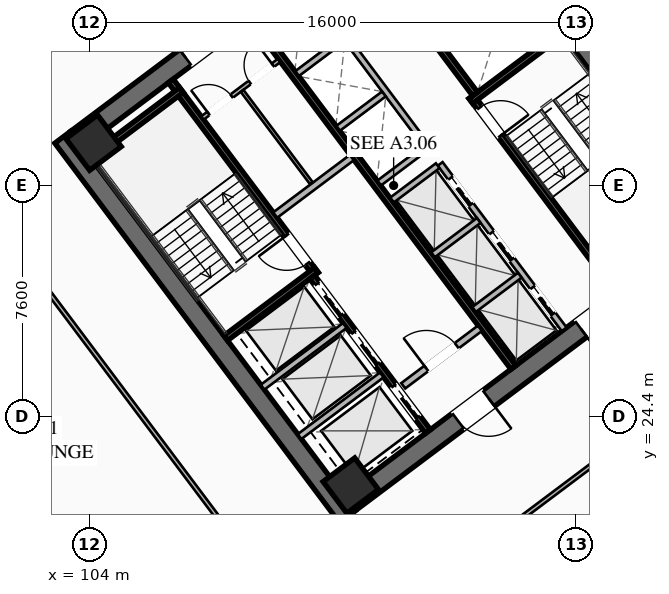
"""IFC4 building model, lengths in metres.
Left out: names, types, materials, properties, quantities, classifications, styles, units other than length and angle.
Written with IfcOpenShell. Run it as: python <this file> out.ifc"""

import sys

from ifc_helpers import new_model, si_unit, direction, frame, frame_2d, origin, origin_2d, place, context, subcontext, project, spatial, rectangle, hollow_rectangle, extrude, element, fill, save


model = new_model("IFC4")
c1 = context("Model", 3, precision=1e-05, world=origin(), true_north=direction((0.0, 1.0)))
c2 = subcontext(c1, "Body", "Model", "MODEL_VIEW")
j1 = project(units=[si_unit("LENGTHUNIT", "METRE"), si_unit("PLANEANGLEUNIT", "RADIAN")], contexts=[c1])
p1 = place(None, origin())
s1 = spatial("IfcSite", under=j1, at=p1, CompositionType="ELEMENT")
p2 = place(p1, origin())
s2 = spatial("IfcBuilding", under=s1, at=p2, CompositionType="ELEMENT")
p3 = place(p2, frame((0.0, 0.0, 81.4)))
s3 = spatial("IfcBuildingStorey", under=s2, at=p3, CompositionType="ELEMENT", Elevation=81.4)
for number, where, z_axis, x_axis in (
    (1, (112.476, 21.107, 0.0), (0.0, 0.0, 1.0), (-0.6, 0.8, 0.0)),
    (2, (115.524, 42.893, 0.0), (0.0, 0.0, 1.0), (0.6, -0.8, 0.0)),
):
    element("IfcWall", number, at=place(p3, frame(where, z_axis=z_axis, x_axis=x_axis)), inside=s3, PredefinedType="SHEAR", context=c2, shape_type="SweptSolid", body=[
        extrude(rectangle(XDim=15.6, YDim=0.65, at=frame_2d((7.8, 0.0))), origin(), (0.0, 0.0, 1.0), 3.55),
    ])
p4 = place(p3, frame((124.429, 30.478, 0.0), z_axis=(0.0, 0.0, 1.0), x_axis=(-0.799998028465, -0.600002628705, 0.0)))
e3 = element("IfcWall", 3, at=p4, inside=s3, PredefinedType="SHEAR", context=c2, shape_type="SweptSolid", body=[
    extrude(rectangle(XDim=14.86, YDim=0.65, at=frame_2d((7.43, 0.0))), origin(), (0.0, 0.0, 1.0), 3.55),
])
p5 = place(p4, frame((9.13, 0.0, 0.0)))
e4 = element("IfcOpeningElement", 4, at=p5, cuts=e3, PredefinedType="OPENING", context=c2, shape_type="SweptSolid", body=[
    extrude(rectangle(XDim=1.25, YDim=2.25, at=frame_2d((0.625, 1.125))), frame((0.0, 0.335, 0.0), z_axis=(0.0, -1.0, 0.0), x_axis=(1.0, 0.0, 0.0)), (0.0, 0.0, 1.0), 0.67),
])
p6 = place(p4, frame((4.08, 0.0, 0.0)))
e5 = element("IfcOpeningElement", 5, at=p6, cuts=e3, PredefinedType="OPENING", context=c2, shape_type="SweptSolid", body=[
    extrude(rectangle(XDim=1.25, YDim=2.25, at=frame_2d((0.625, 1.125))), frame((0.0, 0.335, 0.0), z_axis=(0.0, -1.0, 0.0), x_axis=(1.0, 0.0, 0.0)), (0.0, 0.0, 1.0), 0.67),
])
p7 = place(p3, frame((103.571, 33.522, 0.0), z_axis=(0.0, 0.0, 1.0), x_axis=(0.799998028465, 0.600002628705, 0.0)))
e6 = element("IfcWall", 6, at=p7, inside=s3, PredefinedType="SHEAR", context=c2, shape_type="SweptSolid", body=[
    extrude(rectangle(XDim=14.86, YDim=0.65, at=frame_2d((7.43, 0.0))), origin(), (0.0, 0.0, 1.0), 3.55),
])
p8 = place(p7, frame((4.48, 0.0, 0.0)))
e7 = element("IfcOpeningElement", 7, at=p8, cuts=e6, PredefinedType="OPENING", context=c2, shape_type="SweptSolid", body=[
    extrude(rectangle(XDim=1.25, YDim=2.25, at=frame_2d((0.625, 1.125))), frame((0.0, 0.335, 0.0), z_axis=(0.0, -1.0, 0.0), x_axis=(1.0, 0.0, 0.0)), (0.0, 0.0, 1.0), 0.67),
])
p9 = place(p7, frame((9.53, 0.0, 0.0)))
e8 = element("IfcOpeningElement", 8, at=p9, cuts=e6, PredefinedType="OPENING", context=c2, shape_type="SweptSolid", body=[
    extrude(rectangle(XDim=1.25, YDim=2.25, at=frame_2d((0.625, 1.125))), frame((0.0, 0.335, 0.0), z_axis=(0.0, -1.0, 0.0), x_axis=(1.0, 0.0, 0.0)), (0.0, 0.0, 1.0), 0.67),
])
for number, where, z_axis, x_axis in (
    (9, (112.59, 22.13, 0.0), (0.0, 0.0, 1.0), (0.8, 0.6, 0.0)),
    (10, (104.13, 33.41, 0.0), (0.0, 0.0, 1.0), (0.8, 0.6, 0.0)),
):
    element("IfcColumn", number, at=place(p3, frame(where, z_axis=z_axis, x_axis=x_axis)), inside=s3, PredefinedType="COLUMN", context=c2, shape_type="SweptSolid", body=[
        extrude(hollow_rectangle(XDim=1.3, YDim=1.3, WallThickness=0.05, at=origin_2d()), origin(), (0.0, 0.0, 1.0), 3.35),
    ])
p10 = place(p3, frame((111.44, 29.08, 0.0), z_axis=(0.0, 0.0, 1.0), x_axis=(-0.600009827119, 0.799992629566, 0.0)))
e11 = element("IfcWall", 11, at=p10, inside=s3, PredefinedType="SHEAR", context=c2, shape_type="SweptSolid", body=[
    extrude(rectangle(XDim=7.95, YDim=0.2, at=frame_2d((3.975, 0.0))), origin(), (0.0, 0.0, 1.0), 3.35),
])
p11 = place(p10, frame((0.45, 0.0, 0.0)))
e12 = element("IfcOpeningElement", 12, at=p11, cuts=e11, PredefinedType="OPENING", context=c2, shape_type="SweptSolid", body=[
    extrude(rectangle(XDim=1.15, YDim=2.2, at=frame_2d((0.575, 1.1))), frame((0.0, 0.11, 0.0), z_axis=(0.0, -1.0, 0.0), x_axis=(1.0, 0.0, 0.0)), (0.0, 0.0, 1.0), 0.22),
])
for number, where, z_axis, x_axis in (
    (13, (108.476, 26.982, 0.0), (0.0, 0.0, 1.0), (0.8, 0.6, 0.0)),
    (14, (104.036, 32.902, 0.0), (0.0, 0.0, 1.0), (0.8, 0.6, 0.0)),
):
    element("IfcWall", number, at=place(p3, frame(where, z_axis=z_axis, x_axis=x_axis)), inside=s3, PredefinedType="SHEAR", context=c2, shape_type="SweptSolid", body=[
        extrude(rectangle(XDim=3.73, YDim=0.2, at=frame_2d((1.865, 0.0))), origin(), (0.0, 0.0, 1.0), 3.35),
    ])
p12 = place(p3, frame((116.56, 34.92, 0.0), z_axis=(0.0, 0.0, 1.0), x_axis=(0.600009827119, -0.799992629566, 0.0)))
e15 = element("IfcWall", 15, at=p12, inside=s3, PredefinedType="SHEAR", context=c2, shape_type="SweptSolid", body=[
    extrude(rectangle(XDim=7.95, YDim=0.2, at=frame_2d((3.975, 0.0))), origin(), (0.0, 0.0, 1.0), 3.35),
])
p13 = place(p12, frame((0.45, 0.0, 0.0)))
e16 = element("IfcOpeningElement", 16, at=p13, cuts=e15, PredefinedType="OPENING", context=c2, shape_type="SweptSolid", body=[
    extrude(rectangle(XDim=1.15, YDim=2.2, at=frame_2d((0.575, 1.1))), frame((0.0, 0.11, 0.0), z_axis=(0.0, -1.0, 0.0), x_axis=(1.0, 0.0, 0.0)), (0.0, 0.0, 1.0), 0.22),
])
p14 = place(p3, frame((116.54, 34.78, 0.0), z_axis=(0.0, 0.0, 1.0), x_axis=(0.799984290658, 0.600020945218, 0.0)))
e17 = element("IfcWall", 17, at=p14, inside=s3, PredefinedType="SHEAR", context=c2, shape_type="SweptSolid", body=[
    extrude(rectangle(XDim=3.73, YDim=0.2, at=frame_2d((1.865, 0.0))), origin(), (0.0, 0.0, 1.0), 3.35),
])
p15 = place(p3, frame((117.938, 26.016, 0.0), z_axis=(0.0, 0.0, 1.0), x_axis=(-0.600005463273, 0.799995902516, 0.0)))
e18 = element("IfcWall", 18, at=p15, inside=s3, PredefinedType="SHEAR", context=c2, shape_type="SweptSolid", body=[
    extrude(rectangle(XDim=14.3, YDim=0.2, at=frame_2d((7.15, 0.0))), origin(), (0.0, 0.0, 1.0), 3.35),
])
p16 = place(p3, frame((110.104, 31.028, 0.0), z_axis=(0.0, 0.0, 1.0), x_axis=(0.800018601094, 0.59997519774, 0.0)))
e19 = element("IfcWall", 19, at=p16, inside=s3, PredefinedType="SOLIDWALL", context=c2, shape_type="SweptSolid", body=[
    extrude(rectangle(XDim=3.15, YDim=0.22, at=frame_2d((1.575, 0.0))), origin(), (0.0, 0.0, 1.0), 2.703),
])
p17 = place(p3, frame((114.316, 25.412, 0.0), z_axis=(0.0, 0.0, 1.0), x_axis=(0.800018601094, 0.59997519774, 0.0)))
e20 = element("IfcWall", 20, at=p17, inside=s3, PredefinedType="SOLIDWALL", context=c2, shape_type="SweptSolid", body=[
    extrude(rectangle(XDim=3.15, YDim=0.22, at=frame_2d((1.575, 0.0))), origin(), (0.0, 0.0, 1.0), 2.703),
])
p18 = place(p17, frame((0.95, 0.0, 0.0)))
e21 = element("IfcOpeningElement", 21, at=p18, cuts=e20, PredefinedType="OPENING", context=c2, shape_type="SweptSolid", body=[
    extrude(rectangle(XDim=1.25, YDim=2.25, at=frame_2d((0.625, 1.125))), frame((0.0, 0.12, 0.0), z_axis=(0.0, -1.0, 0.0), x_axis=(1.0, 0.0, 0.0)), (0.0, 0.0, 1.0), 0.24),
])
p19 = place(p3, frame((115.13, 23.91, 0.0), z_axis=(0.0, 0.0, 1.0), x_axis=(-0.599975393228, 0.800018454488, 0.0)))
e22 = element("IfcWall", 22, at=p19, inside=s3, PredefinedType="SHEAR", context=c2, shape_type="SweptSolid", body=[
    extrude(rectangle(XDim=6.35, YDim=0.2, at=frame_2d((3.175, 0.0))), origin(), (0.0, 0.0, 1.0), 3.35),
])
p20 = place(p19, frame((4.775, 0.0, 0.0)))
e23 = element("IfcOpeningElement", 23, at=p20, cuts=e22, PredefinedType="OPENING", context=c2, shape_type="SweptSolid", body=[
    extrude(rectangle(XDim=1.3, YDim=2.25, at=frame_2d((0.65, 1.125))), frame((0.0, 0.11, 0.0), z_axis=(0.0, -1.0, 0.0), x_axis=(1.0, 0.0, 0.0)), (0.0, 0.0, 1.0), 0.22),
])
p21 = place(p19, frame((2.775, 0.0, 0.0)))
e24 = element("IfcOpeningElement", 24, at=p21, cuts=e22, PredefinedType="OPENING", context=c2, shape_type="SweptSolid", body=[
    extrude(rectangle(XDim=1.3, YDim=2.25, at=frame_2d((0.65, 1.125))), frame((0.0, 0.11, 0.0), z_axis=(0.0, -1.0, 0.0), x_axis=(1.0, 0.0, 0.0)), (0.0, 0.0, 1.0), 0.22),
])
p22 = place(p19, frame((0.575, 0.0, 0.0)))
e25 = element("IfcOpeningElement", 25, at=p22, cuts=e22, PredefinedType="OPENING", context=c2, shape_type="SweptSolid", body=[
    extrude(rectangle(XDim=1.3, YDim=2.25, at=frame_2d((0.65, 1.125))), frame((0.0, 0.11, 0.0), z_axis=(0.0, -1.0, 0.0), x_axis=(1.0, 0.0, 0.0)), (0.0, 0.0, 1.0), 0.22),
])
for number, where, z_axis, x_axis in (
    (26, (110.906, 23.742, 0.0), (0.0, 0.0, 1.0), (0.8, 0.6, 0.0)),
    (27, (109.688, 25.366, 0.0), (0.0, 0.0, 1.0), (0.8, 0.6, 0.0)),
):
    element("IfcWall", number, at=place(p3, frame(where, z_axis=z_axis, x_axis=x_axis)), inside=s3, PredefinedType="SOLIDWALL", context=c2, shape_type="SweptSolid", body=[
        extrude(rectangle(XDim=3.38, YDim=0.2, at=frame_2d((1.69, 0.0))), origin(), (0.0, 0.0, 1.0), 3.35),
    ])
p23 = place(p3, frame((112.87, 40.09, 0.0), z_axis=(0.0, 0.0, 1.0), x_axis=(0.599975393228, -0.800018454488, 0.0)))
e28 = element("IfcWall", 28, at=p23, inside=s3, PredefinedType="SHEAR", context=c2, shape_type="SweptSolid", body=[
    extrude(rectangle(XDim=6.35, YDim=0.2, at=frame_2d((3.175, 0.0))), origin(), (0.0, 0.0, 1.0), 3.35),
])
p24 = place(p3, frame((107.71, 34.22, 0.0), z_axis=(0.0, 0.0, 1.0), x_axis=(0.799981399002, 0.60002480053, 0.0)))
e29 = element("IfcWall", 29, at=p24, inside=s3, PredefinedType="PARTITIONING", context=c2, shape_type="SweptSolid", body=[
    extrude(rectangle(XDim=3.15, YDim=0.135, at=frame_2d((1.575, 0.0))), origin(), (0.0, 0.0, 1.0), 2.703),
])
p25 = place(p24, frame((0.25, 0.0, 0.0)))
e30 = element("IfcOpeningElement", 30, at=p25, cuts=e29, PredefinedType="OPENING", context=c2, shape_type="SweptSolid", body=[
    extrude(rectangle(XDim=0.95, YDim=2.05, at=frame_2d((0.475, 1.025))), frame((0.0, 0.077, 0.0), z_axis=(0.0, -1.0, 0.0), x_axis=(1.0, 0.0, 0.0)), (0.0, 0.0, 1.0), 0.155),
])
p26 = place(p24, frame((1.95, 0.0, 0.0)))
e31 = element("IfcOpeningElement", 31, at=p26, cuts=e29, PredefinedType="OPENING", context=c2, shape_type="SweptSolid", body=[
    extrude(rectangle(XDim=0.95, YDim=2.05, at=frame_2d((0.475, 1.025))), frame((0.0, 0.077, 0.0), z_axis=(0.0, -1.0, 0.0), x_axis=(1.0, 0.0, 0.0)), (0.0, 0.0, 1.0), 0.155),
])
p27 = place(p3, frame((111.296, 32.072, 0.0), z_axis=(0.0, 0.0, 1.0), x_axis=(-0.59995887973, 0.800030838552, 0.0)))
e32 = element("IfcWall", 32, at=p27, inside=s3, PredefinedType="PARTITIONING", context=c2, shape_type="SweptSolid", body=[
    extrude(rectangle(XDim=3.8, YDim=0.11, at=frame_2d((1.9, 0.0))), origin(), (0.0, 0.0, 1.0), 2.703),
])
p28 = place(p3, frame((119.61, 27.27, 0.0), z_axis=(0.0, 0.0, 1.0), x_axis=(-0.600011488909, 0.79999138319, 0.0)))
e33 = element("IfcWall", 33, at=p28, inside=s3, PredefinedType="SOLIDWALL", context=c2, shape_type="SweptSolid", body=[
    extrude(rectangle(XDim=6.8, YDim=0.2, at=frame_2d((3.4, 0.0))), origin(), (0.0, 0.0, 1.0), 3.35),
])
p29 = place(p28, frame((0.625, 0.0, 0.0)))
e34 = element("IfcOpeningElement", 34, at=p29, cuts=e33, PredefinedType="OPENING", context=c2, shape_type="SweptSolid", body=[
    extrude(rectangle(XDim=1.1, YDim=2.2, at=frame_2d((0.55, 1.1))), frame((0.0, 0.11, 0.0), z_axis=(0.0, -1.0, 0.0), x_axis=(1.0, 0.0, 0.0)), (0.0, 0.0, 1.0), 0.22),
])
p30 = place(p28, frame((2.875, 0.0, 0.0)))
e35 = element("IfcOpeningElement", 35, at=p30, cuts=e33, PredefinedType="OPENING", context=c2, shape_type="SweptSolid", body=[
    extrude(rectangle(XDim=1.1, YDim=2.2, at=frame_2d((0.55, 1.1))), frame((0.0, 0.11, 0.0), z_axis=(0.0, -1.0, 0.0), x_axis=(1.0, 0.0, 0.0)), (0.0, 0.0, 1.0), 0.22),
])
p31 = place(p28, frame((5.125, 0.0, 0.0)))
e36 = element("IfcOpeningElement", 36, at=p31, cuts=e33, PredefinedType="OPENING", context=c2, shape_type="SweptSolid", body=[
    extrude(rectangle(XDim=1.1, YDim=2.2, at=frame_2d((0.55, 1.1))), frame((0.0, 0.11, 0.0), z_axis=(0.0, -1.0, 0.0), x_axis=(1.0, 0.0, 0.0)), (0.0, 0.0, 1.0), 0.22),
])
p32 = place(p3, frame((116.646, 27.922, 0.0), z_axis=(0.0, 0.0, 1.0), x_axis=(0.8, 0.6, 0.0)))
e37 = element("IfcWall", 37, at=p32, inside=s3, PredefinedType="SOLIDWALL", context=c2, shape_type="SweptSolid", body=[
    extrude(rectangle(XDim=1.88, YDim=0.2, at=frame_2d((0.94, 0.0))), origin(), (0.0, 0.0, 1.0), 3.35),
])
p33 = place(p3, frame((115.296, 29.722, 0.0), z_axis=(0.0, 0.0, 1.0), x_axis=(0.799984418148, 0.600020775241, 0.0)))
e38 = element("IfcWall", 38, at=p33, inside=s3, PredefinedType="SOLIDWALL", context=c2, shape_type="SweptSolid", body=[
    extrude(rectangle(XDim=1.88, YDim=0.2, at=frame_2d((0.94, 0.0))), origin(), (0.0, 0.0, 1.0), 3.35),
])
p34 = place(p3, frame((113.946, 31.522, 0.0), z_axis=(0.0, 0.0, 1.0), x_axis=(0.8, 0.6, 0.0)))
e39 = element("IfcWall", 39, at=p34, inside=s3, PredefinedType="SOLIDWALL", context=c2, shape_type="SweptSolid", body=[
    extrude(rectangle(XDim=1.88, YDim=0.2, at=frame_2d((0.94, 0.0))), origin(), (0.0, 0.0, 1.0), 3.35),
])
p35 = place(p3, frame((115.11, 33.27, 0.0), z_axis=(0.0, 0.0, 1.0), x_axis=(-0.600011488909, 0.79999138319, 0.0)))
e40 = element("IfcWall", 40, at=p35, inside=s3, PredefinedType="SOLIDWALL", context=c2, shape_type="SweptSolid", body=[
    extrude(rectangle(XDim=6.8, YDim=0.2, at=frame_2d((3.4, 0.0))), origin(), (0.0, 0.0, 1.0), 3.35),
])
p36 = place(p3, frame((113.526, 32.082, 0.0), z_axis=(0.0, 0.0, 1.0), x_axis=(0.800046745961, 0.599937666993, 0.0)))
e41 = element("IfcWall", 41, at=p36, inside=s3, PredefinedType="SOLIDWALL", context=c2, shape_type="SweptSolid", body=[
    extrude(rectangle(XDim=1.88, YDim=0.2, at=frame_2d((0.94, 0.0))), origin(), (0.0, 0.0, 1.0), 3.35),
])
p37 = place(p3, frame((112.176, 33.882, 0.0), z_axis=(0.0, 0.0, 1.0), x_axis=(0.8, 0.6, 0.0)))
e42 = element("IfcWall", 42, at=p37, inside=s3, PredefinedType="SOLIDWALL", context=c2, shape_type="SweptSolid", body=[
    extrude(rectangle(XDim=1.88, YDim=0.2, at=frame_2d((0.94, 0.0))), origin(), (0.0, 0.0, 1.0), 3.35),
])
p38 = place(p3, frame((110.826, 35.682, 0.0), z_axis=(0.0, 0.0, 1.0), x_axis=(0.799984418148, 0.600020775241, 0.0)))
e43 = element("IfcWall", 43, at=p38, inside=s3, PredefinedType="SOLIDWALL", context=c2, shape_type="SweptSolid", body=[
    extrude(rectangle(XDim=1.88, YDim=0.2, at=frame_2d((0.94, 0.0))), origin(), (0.0, 0.0, 1.0), 3.35),
])
p39 = place(p3, frame((98.516, 34.012, 0.0), z_axis=(0.0, 0.0, 1.0), x_axis=(0.8, 0.6, 0.0)))
e44 = element("IfcWall", 44, at=p39, inside=s3, PredefinedType="PARTITIONING", context=c2, shape_type="SweptSolid", body=[
    extrude(rectangle(XDim=28.23, YDim=0.135, at=frame_2d((14.115, 0.0))), origin(), (0.0, 0.0, 1.0), 2.703),
])
p40 = place(p39, frame((0.3, 0.0, 0.0)))
e45 = element("IfcOpeningElement", 45, at=p40, cuts=e44, PredefinedType="OPENING", context=c2, shape_type="SweptSolid", body=[
    extrude(rectangle(XDim=0.95, YDim=2.05, at=frame_2d((0.475, 1.025))), frame((0.0, 0.077, 0.0), z_axis=(0.0, -1.0, 0.0), x_axis=(1.0, 0.0, 0.0)), (0.0, 0.0, 1.0), 0.155),
])
p41 = place(p39, frame((10.792, 0.0, 0.0)))
e46 = element("IfcOpeningElement", 46, at=p41, cuts=e44, PredefinedType="OPENING", context=c2, shape_type="SweptSolid", body=[
    extrude(rectangle(XDim=0.95, YDim=2.05, at=frame_2d((0.475, 1.025))), frame((0.0, 0.077, 0.0), z_axis=(0.0, -1.0, 0.0), x_axis=(1.0, 0.0, 0.0)), (0.0, 0.0, 1.0), 0.155),
])
p42 = place(p39, frame((26.98, 0.0, 0.0)))
e47 = element("IfcOpeningElement", 47, at=p42, cuts=e44, PredefinedType="OPENING", context=c2, shape_type="SweptSolid", body=[
    extrude(rectangle(XDim=0.95, YDim=2.05, at=frame_2d((0.475, 1.025))), frame((0.0, 0.077, 0.0), z_axis=(0.0, -1.0, 0.0), x_axis=(1.0, 0.0, 0.0)), (0.0, 0.0, 1.0), 0.155),
])
p43 = place(p3, frame((134.402, 33.214, 0.0), z_axis=(0.0, 0.0, 1.0), x_axis=(-0.799995848831, -0.600005534853, 0.0)))
e48 = element("IfcWall", 48, at=p43, inside=s3, PredefinedType="PARTITIONING", context=c2, shape_type="SweptSolid", body=[
    extrude(rectangle(XDim=28.23, YDim=0.135, at=frame_2d((14.115, 0.0))), origin(), (0.0, 0.0, 1.0), 2.703),
])
p44 = place(p43, frame((26.9, 0.0, 0.0)))
e49 = element("IfcOpeningElement", 49, at=p44, cuts=e48, PredefinedType="OPENING", context=c2, shape_type="SweptSolid", body=[
    extrude(rectangle(XDim=0.95, YDim=2.05, at=frame_2d((0.475, 1.025))), frame((0.0, 0.077, 0.0), z_axis=(0.0, -1.0, 0.0), x_axis=(1.0, 0.0, 0.0)), (0.0, 0.0, 1.0), 0.155),
])
p45 = place(p43, frame((0.38, 0.0, 0.0)))
e50 = element("IfcOpeningElement", 50, at=p45, cuts=e48, PredefinedType="OPENING", context=c2, shape_type="SweptSolid", body=[
    extrude(rectangle(XDim=0.95, YDim=2.05, at=frame_2d((0.475, 1.025))), frame((0.0, 0.077, 0.0), z_axis=(0.0, -1.0, 0.0), x_axis=(1.0, 0.0, 0.0)), (0.0, 0.0, 1.0), 0.155),
])
p46 = place(p3, frame((111.77, 16.34, 0.0), z_axis=(0.0, 0.0, 1.0), x_axis=(-0.600003549523, 0.799997337845, 0.0)))
e51 = element("IfcWall", 51, at=p46, inside=s3, PredefinedType="PARTITIONING", context=c2, shape_type="SweptSolid", body=[
    extrude(rectangle(XDim=22.01, YDim=0.135, at=frame_2d((11.005, 0.0))), origin(), (0.0, 0.0, 1.0), 2.703),
])
p47 = place(p46, frame((0.3, 0.0, 0.0)))
e52 = element("IfcOpeningElement", 52, at=p47, cuts=e51, PredefinedType="OPENING", context=c2, shape_type="SweptSolid", body=[
    extrude(rectangle(XDim=0.95, YDim=2.05, at=frame_2d((0.475, 1.025))), frame((0.0, 0.077, 0.0), z_axis=(0.0, -1.0, 0.0), x_axis=(1.0, 0.0, 0.0)), (0.0, 0.0, 1.0), 0.155),
])
p48 = place(p8, origin())
e53 = element("IfcDoor", 53, at=p48, inside=s3, OperationType="SINGLE_SWING_LEFT", PredefinedType="DOOR", context=c2, shape_type="SweptSolid", body=[
    extrude(rectangle(XDim=1.25, YDim=2.25, at=frame_2d((0.625, 1.125))), frame((0.0, 0.025, 0.0), z_axis=(0.0, -1.0, 0.0), x_axis=(1.0, 0.0, 0.0)), (0.0, 0.0, 1.0), 0.05),
])
fill(e7, e53)
p49 = place(p5, origin())
e54 = element("IfcDoor", 54, at=p49, inside=s3, OperationType="SINGLE_SWING_LEFT", PredefinedType="DOOR", context=c2, shape_type="SweptSolid", body=[
    extrude(rectangle(XDim=1.25, YDim=2.25, at=frame_2d((0.625, 1.125))), frame((0.0, 0.025, 0.0), z_axis=(0.0, -1.0, 0.0), x_axis=(1.0, 0.0, 0.0)), (0.0, 0.0, 1.0), 0.05),
])
fill(e4, e54)
p50 = place(p6, origin())
e55 = element("IfcDoor", 55, at=p50, inside=s3, OperationType="SINGLE_SWING_RIGHT", PredefinedType="DOOR", context=c2, shape_type="SweptSolid", body=[
    extrude(rectangle(XDim=1.25, YDim=2.25, at=frame_2d((0.625, 1.125))), frame((0.0, 0.025, 0.0), z_axis=(0.0, -1.0, 0.0), x_axis=(1.0, 0.0, 0.0)), (0.0, 0.0, 1.0), 0.05),
])
fill(e5, e55)
p51 = place(p11, origin())
e56 = element("IfcDoor", 56, at=p51, inside=s3, OperationType="SINGLE_SWING_RIGHT", PredefinedType="DOOR", context=c2, shape_type="SweptSolid", body=[
    extrude(rectangle(XDim=1.15, YDim=2.2, at=frame_2d((0.575, 1.1))), frame((0.0, 0.025, 0.0), z_axis=(0.0, -1.0, 0.0), x_axis=(1.0, 0.0, 0.0)), (0.0, 0.0, 1.0), 0.05),
])
fill(e12, e56)
p52 = place(p13, origin())
e57 = element("IfcDoor", 57, at=p52, inside=s3, OperationType="SINGLE_SWING_RIGHT", PredefinedType="DOOR", context=c2, shape_type="SweptSolid", body=[
    extrude(rectangle(XDim=1.15, YDim=2.2, at=frame_2d((0.575, 1.1))), frame((0.0, 0.025, 0.0), z_axis=(0.0, -1.0, 0.0), x_axis=(1.0, 0.0, 0.0)), (0.0, 0.0, 1.0), 0.05),
])
fill(e16, e57)
p53 = place(p18, origin())
e58 = element("IfcDoor", 58, at=p53, inside=s3, OperationType="SINGLE_SWING_LEFT", PredefinedType="DOOR", context=c2, shape_type="SweptSolid", body=[
    extrude(rectangle(XDim=1.25, YDim=2.25, at=frame_2d((0.625, 1.125))), frame((0.0, 0.025, 0.0), z_axis=(0.0, -1.0, 0.0), x_axis=(1.0, 0.0, 0.0)), (0.0, 0.0, 1.0), 0.05),
])
fill(e21, e58)
p54 = place(p25, origin())
e59 = element("IfcDoor", 59, at=p54, inside=s3, OperationType="SINGLE_SWING_LEFT", PredefinedType="DOOR", context=c2, shape_type="SweptSolid", body=[
    extrude(rectangle(XDim=0.95, YDim=2.05, at=frame_2d((0.475, 1.025))), frame((0.0, 0.025, 0.0), z_axis=(0.0, -1.0, 0.0), x_axis=(1.0, 0.0, 0.0)), (0.0, 0.0, 1.0), 0.05),
])
fill(e30, e59)
p55 = place(p26, origin())
e60 = element("IfcDoor", 60, at=p55, inside=s3, OperationType="SINGLE_SWING_RIGHT", PredefinedType="DOOR", context=c2, shape_type="SweptSolid", body=[
    extrude(rectangle(XDim=0.95, YDim=2.05, at=frame_2d((0.475, 1.025))), frame((0.0, 0.025, 0.0), z_axis=(0.0, -1.0, 0.0), x_axis=(1.0, 0.0, 0.0)), (0.0, 0.0, 1.0), 0.05),
])
fill(e31, e60)
p56 = place(p20, origin())
e61 = element("IfcDoor", 61, at=p56, inside=s3, OperationType="SLIDING_TO_LEFT", PredefinedType="DOOR", context=c2, shape_type="SweptSolid", body=[
    extrude(rectangle(XDim=1.3, YDim=2.25, at=frame_2d((0.65, 1.125))), frame((0.0, 0.025, 0.0), z_axis=(0.0, -1.0, 0.0), x_axis=(1.0, 0.0, 0.0)), (0.0, 0.0, 1.0), 0.05),
])
fill(e23, e61)
p57 = place(p21, origin())
e62 = element("IfcDoor", 62, at=p57, inside=s3, OperationType="SLIDING_TO_LEFT", PredefinedType="DOOR", context=c2, shape_type="SweptSolid", body=[
    extrude(rectangle(XDim=1.3, YDim=2.25, at=frame_2d((0.65, 1.125))), frame((0.0, 0.025, 0.0), z_axis=(0.0, -1.0, 0.0), x_axis=(1.0, 0.0, 0.0)), (0.0, 0.0, 1.0), 0.05),
])
fill(e24, e62)
p58 = place(p22, origin())
e63 = element("IfcDoor", 63, at=p58, inside=s3, OperationType="SLIDING_TO_LEFT", PredefinedType="DOOR", context=c2, shape_type="SweptSolid", body=[
    extrude(rectangle(XDim=1.3, YDim=2.25, at=frame_2d((0.65, 1.125))), frame((0.0, 0.025, 0.0), z_axis=(0.0, -1.0, 0.0), x_axis=(1.0, 0.0, 0.0)), (0.0, 0.0, 1.0), 0.05),
])
fill(e25, e63)
p59 = place(p29, origin())
e64 = element("IfcDoor", 64, at=p59, inside=s3, OperationType="SLIDING_TO_LEFT", PredefinedType="DOOR", context=c2, shape_type="SweptSolid", body=[
    extrude(rectangle(XDim=1.1, YDim=2.2, at=frame_2d((0.55, 1.1))), frame((0.0, 0.025, 0.0), z_axis=(0.0, -1.0, 0.0), x_axis=(1.0, 0.0, 0.0)), (0.0, 0.0, 1.0), 0.05),
])
fill(e34, e64)
p60 = place(p30, origin())
e65 = element("IfcDoor", 65, at=p60, inside=s3, OperationType="SLIDING_TO_LEFT", PredefinedType="DOOR", context=c2, shape_type="SweptSolid", body=[
    extrude(rectangle(XDim=1.1, YDim=2.2, at=frame_2d((0.55, 1.1))), frame((0.0, 0.025, 0.0), z_axis=(0.0, -1.0, 0.0), x_axis=(1.0, 0.0, 0.0)), (0.0, 0.0, 1.0), 0.05),
])
fill(e35, e65)
p61 = place(p31, origin())
e66 = element("IfcDoor", 66, at=p61, inside=s3, OperationType="SLIDING_TO_LEFT", PredefinedType="DOOR", context=c2, shape_type="SweptSolid", body=[
    extrude(rectangle(XDim=1.1, YDim=2.2, at=frame_2d((0.55, 1.1))), frame((0.0, 0.025, 0.0), z_axis=(0.0, -1.0, 0.0), x_axis=(1.0, 0.0, 0.0)), (0.0, 0.0, 1.0), 0.05),
])
fill(e36, e66)
save(model, sys.argv[1])
